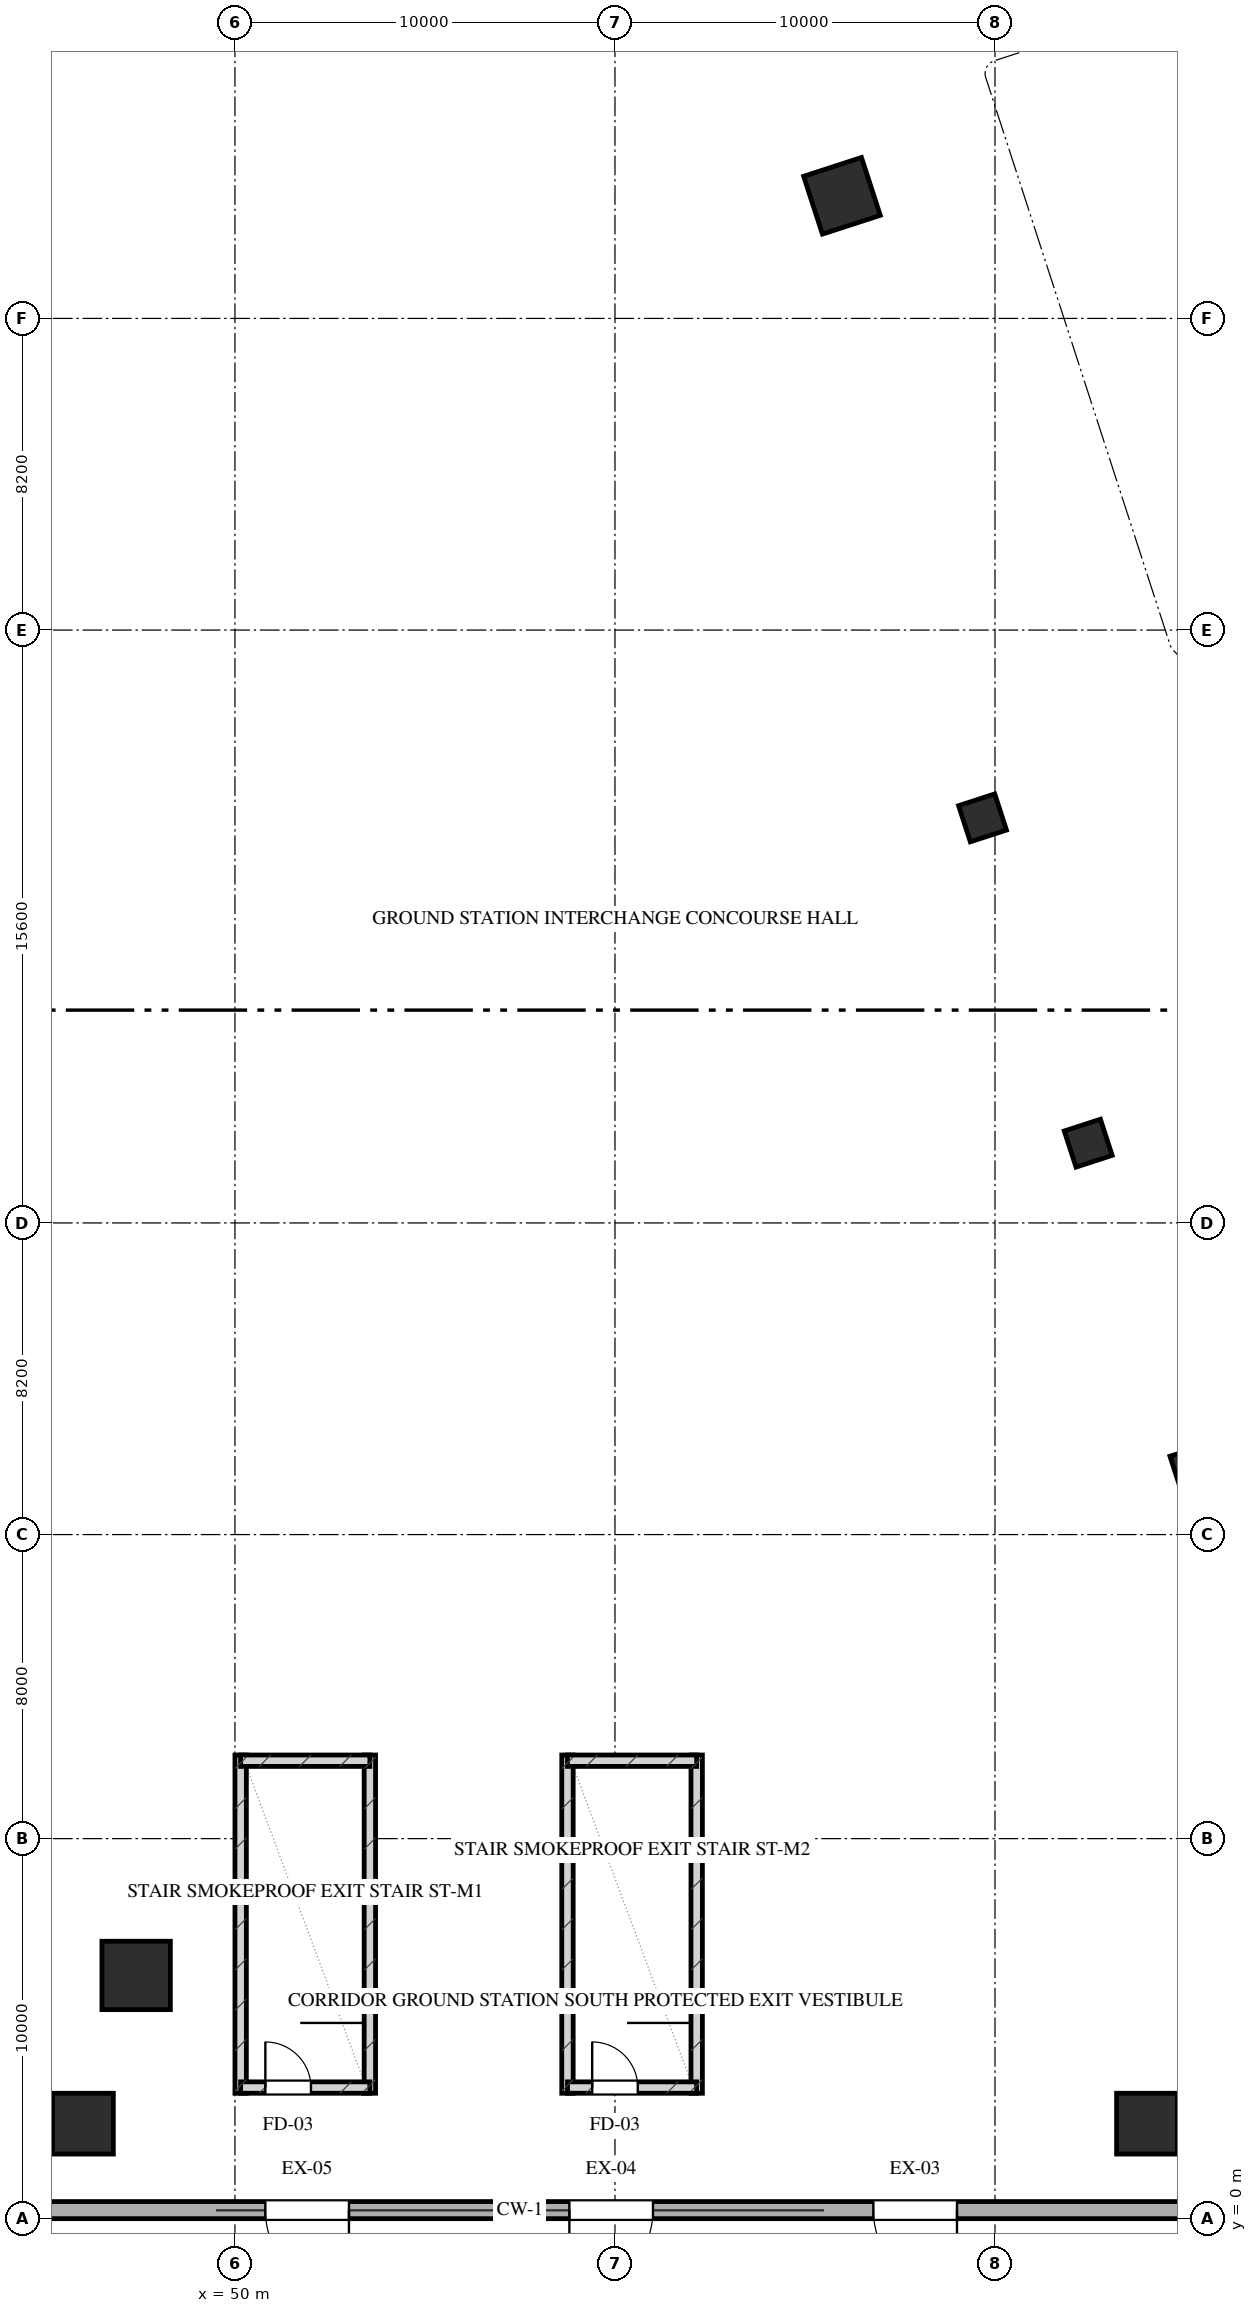
"""IFC4 building model, lengths in metres.
Left out: names, types, materials, properties, quantities, classifications, styles, units other than length and angle.
Written with IfcOpenShell. Run it as: python <this file> out.ifc"""

import sys

from ifc_helpers import new_model, si_unit, direction, frame, frame_2d, origin, origin_2d, place, context, subcontext, project, spatial, rectangle, hollow_rectangle, extrude, element, fill, save


model = new_model("IFC4")
c1 = context("Model", 3, precision=1e-05, world=origin(), true_north=direction((0.0, 1.0)))
c2 = subcontext(c1, "Body", "Model", "MODEL_VIEW")
j1 = project(units=[si_unit("LENGTHUNIT", "METRE"), si_unit("PLANEANGLEUNIT", "RADIAN")], contexts=[c1])
p1 = place(None, origin())
s1 = spatial("IfcSite", under=j1, at=p1, CompositionType="ELEMENT")
p2 = place(p1, origin())
s2 = spatial("IfcBuilding", under=s1, at=p2, CompositionType="ELEMENT")
p3 = place(p2, origin())
s3 = spatial("IfcBuildingStorey", under=s2, at=p3, CompositionType="ELEMENT", Elevation=0.0)
for number, where, z_axis, x_axis in (
    (1, (50.15, 3.3, 0.0), (0.0, 0.0, 1.0), (0.0, 1.0, 0.0)),
    (2, (53.55, 3.3, 0.0), (0.0, 0.0, 1.0), (0.0, 1.0, 0.0)),
):
    element("IfcWall", number, at=place(p3, frame(where, z_axis=z_axis, x_axis=x_axis)), inside=s3, PredefinedType="SHEAR", context=c2, shape_type="SweptSolid", body=[
        extrude(rectangle(XDim=8.9, YDim=0.3, at=frame_2d((4.45, 0.0))), origin(), (0.0, 0.0, 1.0), 3.8),
    ])
p4 = place(p3, frame((50.15, 12.05, 0.0), z_axis=(0.0, 0.0, 1.0), x_axis=(1.0, 0.0, 0.0)))
e3 = element("IfcWall", 3, at=p4, inside=s3, PredefinedType="SHEAR", context=c2, shape_type="SweptSolid", body=[
    extrude(rectangle(XDim=3.4, YDim=0.3, at=frame_2d((1.7, 0.0))), origin(), (0.0, 0.0, 1.0), 3.8),
])
p5 = place(p3, frame((50.15, 3.45, 0.0), z_axis=(0.0, 0.0, 1.0), x_axis=(1.0, 0.0, 0.0)))
e4 = element("IfcWall", 4, at=p5, inside=s3, PredefinedType="SHEAR", context=c2, shape_type="SweptSolid", body=[
    extrude(rectangle(XDim=3.4, YDim=0.3, at=frame_2d((1.7, 0.0))), origin(), (0.0, 0.0, 1.0), 3.8),
])
p6 = place(p5, frame((0.65, 0.0, 0.0)))
e5 = element("IfcOpeningElement", 5, at=p6, cuts=e4, PredefinedType="OPENING", context=c2, shape_type="SweptSolid", body=[
    extrude(rectangle(XDim=1.2, YDim=2.05, at=frame_2d((0.6, 1.025))), frame((0.0, 0.16, 0.0), z_axis=(0.0, -1.0, 0.0), x_axis=(1.0, 0.0, 0.0)), (0.0, 0.0, 1.0), 0.32),
])
for number, where, z_axis, x_axis in (
    (6, (58.75, 3.3, 0.0), (0.0, 0.0, 1.0), (0.0, 1.0, 0.0)),
    (7, (62.15, 3.3, 0.0), (0.0, 0.0, 1.0), (0.0, 1.0, 0.0)),
):
    element("IfcWall", number, at=place(p3, frame(where, z_axis=z_axis, x_axis=x_axis)), inside=s3, PredefinedType="SHEAR", context=c2, shape_type="SweptSolid", body=[
        extrude(rectangle(XDim=8.9, YDim=0.3, at=frame_2d((4.45, 0.0))), origin(), (0.0, 0.0, 1.0), 3.8),
    ])
p7 = place(p3, frame((58.75, 12.05, 0.0), z_axis=(0.0, 0.0, 1.0), x_axis=(1.0, 0.0, 0.0)))
e8 = element("IfcWall", 8, at=p7, inside=s3, PredefinedType="SHEAR", context=c2, shape_type="SweptSolid", body=[
    extrude(rectangle(XDim=3.4, YDim=0.3, at=frame_2d((1.7, 0.0))), origin(), (0.0, 0.0, 1.0), 3.8),
])
p8 = place(p3, frame((58.75, 3.45, 0.0), z_axis=(0.0, 0.0, 1.0), x_axis=(1.0, 0.0, 0.0)))
e9 = element("IfcWall", 9, at=p8, inside=s3, PredefinedType="SHEAR", context=c2, shape_type="SweptSolid", body=[
    extrude(rectangle(XDim=3.4, YDim=0.3, at=frame_2d((1.7, 0.0))), origin(), (0.0, 0.0, 1.0), 3.8),
])
p9 = place(p8, frame((0.65, 0.0, 0.0)))
e10 = element("IfcOpeningElement", 10, at=p9, cuts=e9, PredefinedType="OPENING", context=c2, shape_type="SweptSolid", body=[
    extrude(rectangle(XDim=1.2, YDim=2.05, at=frame_2d((0.6, 1.025))), frame((0.0, 0.16, 0.0), z_axis=(0.0, -1.0, 0.0), x_axis=(1.0, 0.0, 0.0)), (0.0, 0.0, 1.0), 0.32),
])
for number, where, z_axis, x_axis in (
    (11, (46.0, 2.5, 0.0), (0.0, 0.0, 1.0), (1.0, 0.0, 0.0)),
    (12, (74.0, 2.5, 0.0), (0.0, 0.0, 1.0), (1.0, 0.0, 0.0)),
):
    element("IfcColumn", number, at=place(p3, frame(where, z_axis=z_axis, x_axis=x_axis)), inside=s3, PredefinedType="COLUMN", context=c2, shape_type="SweptSolid", body=[
        extrude(hollow_rectangle(XDim=1.6, YDim=1.6, WallThickness=0.055, at=origin_2d()), origin(), (0.0, 0.0, 1.0), 6.001),
    ])
p10 = place(p3, frame((47.4, 6.4, 0.0), z_axis=(0.0, 0.0, 1.0), x_axis=(1.0, 0.0, 0.0)))
e13 = element("IfcColumn", 13, at=p10, inside=s3, PredefinedType="COLUMN", context=c2, shape_type="SweptSolid", body=[
    extrude(hollow_rectangle(XDim=1.8, YDim=1.8, WallThickness=0.06, at=origin_2d()), origin(), (0.0, 0.0, 1.0), 6.001),
])
p11 = place(p3, frame((65.973, 53.226, 0.0), z_axis=(0.0, 0.0, 1.0), x_axis=(0.951056516295, 0.309016994375, 0.0)))
e14 = element("IfcColumn", 14, at=p11, inside=s3, PredefinedType="COLUMN", context=c2, shape_type="SweptSolid", body=[
    extrude(hollow_rectangle(XDim=1.6, YDim=1.6, WallThickness=0.055, at=origin_2d()), origin(), (0.0, 0.0, 1.0), 6.001),
])
for number, where, z_axis, x_axis in (
    (15, (75.234, 19.739, 0.0), (0.0, 0.0, 1.0), (0.951, 0.309, 0.0)),
    (16, (72.453, 28.299, 0.0), (0.0, 0.0, 1.0), (0.951, 0.309, 0.0)),
    (17, (69.672, 36.858, 0.0), (0.0, 0.0, 1.0), (0.951, 0.309, 0.0)),
):
    element("IfcColumn", number, at=place(p3, frame(where, z_axis=z_axis, x_axis=x_axis)), inside=s3, PredefinedType="COLUMN", context=c2, shape_type="SweptSolid", body=[
        extrude(hollow_rectangle(XDim=1.0, YDim=1.0, WallThickness=0.036, at=origin_2d()), origin(), (0.0, 0.0, 1.0), 6.001),
    ])
p12 = place(p3, frame((120.0, 0.225, 0.0), z_axis=(0.0, 0.0, 1.0), x_axis=(-1.0, 0.0, 0.0)))
e18 = element("IfcWall", 18, at=p12, inside=s3, PredefinedType="SOLIDWALL", context=c2, shape_type="SweptSolid", body=[
    extrude(rectangle(XDim=120.0, YDim=0.45, at=frame_2d((60.0, 0.0))), origin(), (0.0, 0.0, 1.0), 5.7),
])
p13 = place(p12, frame((13.0, 0.0, 0.0)))
e19 = element("IfcOpeningElement", 19, at=p13, cuts=e18, PredefinedType="OPENING", context=c2, shape_type="SweptSolid", body=[
    extrude(rectangle(XDim=2.2, YDim=2.4, at=frame_2d((1.1, 1.2))), frame((0.0, 0.235, 0.0), z_axis=(0.0, -1.0, 0.0), x_axis=(1.0, 0.0, 0.0)), (0.0, 0.0, 1.0), 0.47),
])
p14 = place(p12, frame((27.0, 0.0, 0.0)))
e20 = element("IfcOpeningElement", 20, at=p14, cuts=e18, PredefinedType="OPENING", context=c2, shape_type="SweptSolid", body=[
    extrude(rectangle(XDim=2.2, YDim=2.4, at=frame_2d((1.1, 1.2))), frame((0.0, 0.235, 0.0), z_axis=(0.0, -1.0, 0.0), x_axis=(1.0, 0.0, 0.0)), (0.0, 0.0, 1.0), 0.47),
])
p15 = place(p12, frame((51.0, 0.0, 0.0)))
e21 = element("IfcOpeningElement", 21, at=p15, cuts=e18, PredefinedType="OPENING", context=c2, shape_type="SweptSolid", body=[
    extrude(rectangle(XDim=2.2, YDim=2.4, at=frame_2d((1.1, 1.2))), frame((0.0, 0.235, 0.0), z_axis=(0.0, -1.0, 0.0), x_axis=(1.0, 0.0, 0.0)), (0.0, 0.0, 1.0), 0.47),
])
p16 = place(p12, frame((59.0, 0.0, 0.0)))
e22 = element("IfcOpeningElement", 22, at=p16, cuts=e18, PredefinedType="OPENING", context=c2, shape_type="SweptSolid", body=[
    extrude(rectangle(XDim=2.2, YDim=2.4, at=frame_2d((1.1, 1.2))), frame((0.0, 0.235, 0.0), z_axis=(0.0, -1.0, 0.0), x_axis=(1.0, 0.0, 0.0)), (0.0, 0.0, 1.0), 0.47),
])
p17 = place(p12, frame((67.0, 0.0, 0.0)))
e23 = element("IfcOpeningElement", 23, at=p17, cuts=e18, PredefinedType="OPENING", context=c2, shape_type="SweptSolid", body=[
    extrude(rectangle(XDim=2.2, YDim=2.4, at=frame_2d((1.1, 1.2))), frame((0.0, 0.235, 0.0), z_axis=(0.0, -1.0, 0.0), x_axis=(1.0, 0.0, 0.0)), (0.0, 0.0, 1.0), 0.47),
])
p18 = place(p12, frame((86.0, 0.0, 0.0)))
e24 = element("IfcOpeningElement", 24, at=p18, cuts=e18, PredefinedType="OPENING", context=c2, shape_type="SweptSolid", body=[
    extrude(rectangle(XDim=2.2, YDim=2.4, at=frame_2d((1.1, 1.2))), frame((0.0, 0.235, 0.0), z_axis=(0.0, -1.0, 0.0), x_axis=(1.0, 0.0, 0.0)), (0.0, 0.0, 1.0), 0.47),
])
p19 = place(p12, frame((104.0, 0.0, 0.0)))
e25 = element("IfcOpeningElement", 25, at=p19, cuts=e18, PredefinedType="OPENING", context=c2, shape_type="SweptSolid", body=[
    extrude(rectangle(XDim=2.2, YDim=2.4, at=frame_2d((1.1, 1.2))), frame((0.0, 0.235, 0.0), z_axis=(0.0, -1.0, 0.0), x_axis=(1.0, 0.0, 0.0)), (0.0, 0.0, 1.0), 0.47),
])
p20 = place(p15, origin())
e26 = element("IfcDoor", 26, at=p20, inside=s3, OperationType="SINGLE_SWING_LEFT", PredefinedType="DOOR", context=c2, shape_type="SweptSolid", body=[
    extrude(rectangle(XDim=2.2, YDim=2.4, at=frame_2d((1.1, 1.2))), frame((0.0, 0.025, 0.0), z_axis=(0.0, -1.0, 0.0), x_axis=(1.0, 0.0, 0.0)), (0.0, 0.0, 1.0), 0.05),
])
fill(e21, e26)
p21 = place(p16, origin())
e27 = element("IfcDoor", 27, at=p21, inside=s3, OperationType="SINGLE_SWING_RIGHT", PredefinedType="DOOR", context=c2, shape_type="SweptSolid", body=[
    extrude(rectangle(XDim=2.2, YDim=2.4, at=frame_2d((1.1, 1.2))), frame((0.0, 0.025, 0.0), z_axis=(0.0, -1.0, 0.0), x_axis=(1.0, 0.0, 0.0)), (0.0, 0.0, 1.0), 0.05),
])
fill(e22, e27)
p22 = place(p17, origin())
e28 = element("IfcDoor", 28, at=p22, inside=s3, OperationType="SINGLE_SWING_LEFT", PredefinedType="DOOR", context=c2, shape_type="SweptSolid", body=[
    extrude(rectangle(XDim=2.2, YDim=2.4, at=frame_2d((1.1, 1.2))), frame((0.0, 0.025, 0.0), z_axis=(0.0, -1.0, 0.0), x_axis=(1.0, 0.0, 0.0)), (0.0, 0.0, 1.0), 0.05),
])
fill(e23, e28)
p23 = place(p6, origin())
e29 = element("IfcDoor", 29, at=p23, inside=s3, OperationType="SINGLE_SWING_LEFT", PredefinedType="DOOR", context=c2, shape_type="SweptSolid", body=[
    extrude(rectangle(XDim=1.2, YDim=2.05, at=frame_2d((0.6, 1.025))), frame((0.0, 0.025, 0.0), z_axis=(0.0, -1.0, 0.0), x_axis=(1.0, 0.0, 0.0)), (0.0, 0.0, 1.0), 0.05),
])
fill(e5, e29)
p24 = place(p9, origin())
e30 = element("IfcDoor", 30, at=p24, inside=s3, OperationType="SINGLE_SWING_LEFT", PredefinedType="DOOR", context=c2, shape_type="SweptSolid", body=[
    extrude(rectangle(XDim=1.2, YDim=2.05, at=frame_2d((0.6, 1.025))), frame((0.0, 0.025, 0.0), z_axis=(0.0, -1.0, 0.0), x_axis=(1.0, 0.0, 0.0)), (0.0, 0.0, 1.0), 0.05),
])
fill(e10, e30)
save(model, sys.argv[1])
